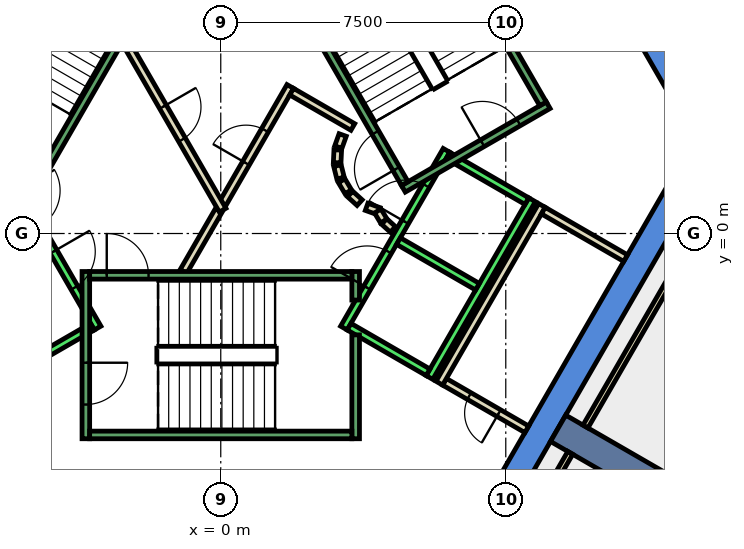
"""IFC4 building model, lengths in metres.
Left out: names, types, materials, properties, quantities, classifications, styles, units other than length and angle.
Written with IfcOpenShell. Run it as: python <this file> out.ifc"""

import sys

from ifc_helpers import new_model, si_unit, direction, frame, frame_2d, origin, place, context, subcontext, project, spatial, polyline, rectangle, outline, extrude, element, fill, save


model = new_model("IFC4")
c1 = context("Model", 3, precision=1e-05, world=origin(), true_north=direction((0.0, 1.0)))
c2 = subcontext(c1, "Body", "Model", "MODEL_VIEW")
j1 = project(units=[si_unit("LENGTHUNIT", "METRE"), si_unit("PLANEANGLEUNIT", "RADIAN")], contexts=[c1])
p1 = place(None, origin())
s1 = spatial("IfcSite", under=j1, at=p1, CompositionType="ELEMENT")
p2 = place(p1, origin())
s2 = spatial("IfcBuilding", under=s1, at=p2, CompositionType="ELEMENT")
p3 = place(p2, frame((0.0, 0.0, 210.8)))
s3 = spatial("IfcBuildingStorey", under=s2, at=p3, CompositionType="ELEMENT", Elevation=210.8)
p4 = place(p3, frame((0.0, 0.0, -0.4)))
e1 = element("IfcWall", 1, at=p4, inside=s3, PredefinedType="SHEAR", context=c2, shape_type="SweptSolid", body=[
    extrude(outline(polyline([(8.084, 11.498), (7.478, 11.148), (12.471, 2.5), (13.279, 2.5), (8.084, 11.498)])), origin(), (0.0, 0.0, 1.0), 4.2),
])
p5 = place(p3, frame((0.0, 0.0, -0.4)))
e2 = element("IfcWall", 2, at=p5, inside=s3, PredefinedType="SHEAR", context=c2, shape_type="SweptSolid", body=[
    extrude(outline(polyline([(6.64, -9.0), (13.279, 2.5), (12.471, 2.5), (6.235, -8.3), (6.64, -9.0)])), origin(), (0.0, 0.0, 1.0), 4.2),
])
p6 = place(p3, frame((8.877, -5.125, -0.4), z_axis=(0.0, 0.0, 1.0), x_axis=(0.866017533419, -0.500013631625, 0.0)))
e3 = element("IfcWall", 3, at=p6, inside=s3, PredefinedType="SHEAR", context=c2, shape_type="SweptSolid", body=[
    extrude(rectangle(XDim=9.0, YDim=0.8, at=frame_2d((4.5, 0.0))), origin(), (0.0, 0.0, 1.0), 4.2),
])
p7 = place(p3, frame((8.053, -5.152, 0.0), z_axis=(0.0, 0.0, 1.0), x_axis=(-0.866022959057, 0.500004234368, 0.0)))
e4 = element("IfcWall", 4, at=p7, inside=s3, PredefinedType="PARTITIONING", context=c2, shape_type="SweptSolid", body=[
    extrude(rectangle(XDim=2.5, YDim=0.2, at=frame_2d((1.25, 0.0))), origin(), (0.0, 0.0, 1.0), 3.8),
])
p8 = place(p7, frame((0.85, 0.0, 0.0)))
e5 = element("IfcOpeningElement", 5, at=p8, cuts=e4, PredefinedType="OPENING", context=c2, shape_type="SweptSolid", body=[
    extrude(rectangle(XDim=0.9, YDim=2.1, at=frame_2d((0.45, 1.05))), frame((0.0, 0.11, 0.0), z_axis=(0.0, -1.0, 0.0), x_axis=(1.0, 0.0, 0.0)), (0.0, 0.0, 1.0), 0.22),
])
p9 = place(p3, frame((5.751, -3.938, 0.0), z_axis=(0.0, 0.0, 1.0), x_axis=(0.500034260056, 0.866005622828, 0.0)))
e6 = element("IfcWall", 6, at=p9, inside=s3, PredefinedType="PARTITIONING", context=c2, shape_type="SweptSolid", body=[
    extrude(rectangle(XDim=5.399, YDim=0.2, at=frame_2d((2.7, 0.0))), origin(), (0.0, 0.0, 1.0), 3.8),
])
p10 = place(p3, frame((8.488, 0.602, 0.0), z_axis=(0.0, 0.0, 1.0), x_axis=(0.866022959057, -0.500004234368, 0.0)))
e7 = element("IfcWall", 7, at=p10, inside=s3, PredefinedType="PARTITIONING", context=c2, shape_type="SweptSolid", body=[
    extrude(rectangle(XDim=2.5, YDim=0.2, at=frame_2d((1.25, 0.0))), origin(), (0.0, 0.0, 1.0), 3.8),
])
p11 = place(p3, frame((7.283, -9.086, 0.0), z_axis=(0.0, 0.0, 1.0), x_axis=(0.500035303972, 0.866005020067, 0.0)))
e8 = element("IfcWall", 8, at=p11, inside=s3, PredefinedType="PARTITIONING", context=c2, shape_type="SweptSolid", body=[
    extrude(rectangle(XDim=3.828, YDim=0.15, at=frame_2d((1.914, 0.0))), origin(), (0.0, 0.0, 1.0), 3.8),
])
p12 = place(p3, frame((-0.982, -1.0, 0.0), z_axis=(0.0, 0.0, 1.0), x_axis=(0.50024047865, 0.865886518847, 0.0)))
e9 = element("IfcWall", 9, at=p12, inside=s3, PredefinedType="PARTITIONING", context=c2, shape_type="SweptSolid", body=[
    extrude(rectangle(XDim=1.863, YDim=0.2, at=frame_2d((0.931, 0.0))), origin(), (0.0, 0.0, 1.0), 3.8),
])
p13 = place(p3, frame((0.05, 0.787, 0.0), z_axis=(0.0, 0.0, 1.0), x_axis=(0.499954076797, 0.866051915934, 0.0)))
e10 = element("IfcWall", 10, at=p13, inside=s3, PredefinedType="PARTITIONING", context=c2, shape_type="SweptSolid", body=[
    extrude(rectangle(XDim=3.558, YDim=0.2, at=frame_2d((1.779, 0.0))), origin(), (0.0, 0.0, 1.0), 3.8),
])
p14 = place(p13, frame((1.229, 0.0, 0.0)))
e11 = element("IfcOpeningElement", 11, at=p14, cuts=e10, PredefinedType="OPENING", context=c2, shape_type="SweptSolid", body=[
    extrude(rectangle(XDim=1.0, YDim=2.1, at=frame_2d((0.5, 1.05))), frame((0.0, 0.11, 0.0), z_axis=(0.0, -1.0, 0.0), x_axis=(1.0, 0.0, 0.0)), (0.0, 0.0, 1.0), 0.22),
])
p15 = place(p3, frame((1.866, 3.732, 0.0), z_axis=(0.0, 0.0, 1.0), x_axis=(0.866043361281, -0.499968895414, 0.0)))
e12 = element("IfcWall", 12, at=p15, inside=s3, PredefinedType="PARTITIONING", context=c2, shape_type="SweptSolid", body=[
    extrude(rectangle(XDim=1.858, YDim=0.2, at=frame_2d((0.929, 0.0))), origin(), (0.0, 0.0, 1.0), 3.8),
])
p16 = place(p3, frame((3.208, 2.592, 0.0), z_axis=(0.0, 0.0, 1.0), x_axis=(-0.337388820924, -0.941365382578, 0.0)))
e13 = element("IfcWall", 13, at=p16, inside=s3, PredefinedType="PARTITIONING", context=c2, shape_type="SweptSolid", body=[
    extrude(rectangle(XDim=0.338, YDim=0.2, at=frame_2d((0.169, 0.0))), origin(), (0.0, 0.0, 1.0), 3.8),
])
p17 = place(p3, frame((3.079, 2.199, 0.0), z_axis=(0.0, 0.0, 1.0), x_axis=(-0.047771483479, -0.998858290933, 0.0)))
e14 = element("IfcWall", 14, at=p17, inside=s3, PredefinedType="PARTITIONING", context=c2, shape_type="SweptSolid", body=[
    extrude(rectangle(XDim=0.337, YDim=0.2, at=frame_2d((0.169, 0.0))), origin(), (0.0, 0.0, 1.0), 3.8),
])
p18 = place(p3, frame((3.07, 1.786, 0.0), z_axis=(0.0, 0.0, 1.0), x_axis=(0.242705583207, -0.970099994784, 0.0)))
e15 = element("IfcWall", 15, at=p18, inside=s3, PredefinedType="PARTITIONING", context=c2, shape_type="SweptSolid", body=[
    extrude(rectangle(XDim=0.338, YDim=0.2, at=frame_2d((0.169, 0.0))), origin(), (0.0, 0.0, 1.0), 3.8),
])
for number, where, z_axis, x_axis in (
    (16, (3.182, 1.388, 0.0), (0.0, 0.0, 1.0), (0.512, -0.859, 0.0)),
    (17, (3.404, 1.039, 0.0), (0.0, 0.0, 1.0), (0.74, -0.672, 0.0)),
):
    element("IfcWall", number, at=place(p3, frame(where, z_axis=z_axis, x_axis=x_axis)), inside=s3, PredefinedType="PARTITIONING", context=c2, shape_type="SweptSolid", body=[
        extrude(rectangle(XDim=0.338, YDim=0.2, at=frame_2d((0.169, 0.0))), origin(), (0.0, 0.0, 1.0), 3.8),
    ])
p19 = place(p3, frame((3.838, 0.702, 0.0), z_axis=(0.0, 0.0, 1.0), x_axis=(0.941035081519, -0.338308993895, 0.0)))
e18 = element("IfcWall", 18, at=p19, inside=s3, PredefinedType="PARTITIONING", context=c2, shape_type="SweptSolid", body=[
    extrude(rectangle(XDim=0.337, YDim=0.2, at=frame_2d((0.168, 0.0))), origin(), (0.0, 0.0, 1.0), 3.8),
])
p20 = place(p3, frame((4.132, 0.593, 0.0), z_axis=(0.0, 0.0, 1.0), x_axis=(0.513561617048, -0.858052717201, 0.0)))
e19 = element("IfcWall", 19, at=p20, inside=s3, PredefinedType="PARTITIONING", context=c2, shape_type="SweptSolid", body=[
    extrude(rectangle(XDim=0.308, YDim=0.2, at=frame_2d((0.154, 0.0))), origin(), (0.0, 0.0, 1.0), 3.8),
])
p21 = place(p3, frame((4.301, 0.315, 0.0), z_axis=(0.0, 0.0, 1.0), x_axis=(0.741798017506, -0.670623367639, 0.0)))
e20 = element("IfcWall", 20, at=p21, inside=s3, PredefinedType="PARTITIONING", context=c2, shape_type="SweptSolid", body=[
    extrude(rectangle(XDim=0.309, YDim=0.2, at=frame_2d((0.154, 0.0))), origin(), (0.0, 0.0, 1.0), 3.8),
])
p22 = place(p3, frame((-2.54, 5.1, 0.0), z_axis=(0.0, 0.0, 1.0), x_axis=(0.499925051871, -0.866068670783, 0.0)))
e21 = element("IfcWall", 21, at=p22, inside=s3, PredefinedType="PARTITIONING", context=c2, shape_type="SweptSolid", body=[
    extrude(rectangle(XDim=5.181, YDim=0.2, at=frame_2d((2.59, 0.0))), origin(), (0.0, 0.0, 1.0), 3.8),
])
p23 = place(p22, frame((2.04, 0.0, 0.0)))
e22 = element("IfcOpeningElement", 22, at=p23, cuts=e21, PredefinedType="OPENING", context=c2, shape_type="SweptSolid", body=[
    extrude(rectangle(XDim=1.0, YDim=2.1, at=frame_2d((0.5, 1.05))), frame((0.0, 0.11, 0.0), z_axis=(0.0, -1.0, 0.0), x_axis=(1.0, 0.0, 0.0)), (0.0, 0.0, 1.0), 0.22),
])
p24 = place(p3, frame((9.597, -5.079, 0.0), z_axis=(0.0, 0.0, 1.0), x_axis=(0.499962477963, 0.866047066059, 0.0)))
e23 = element("IfcWall", 23, at=p24, inside=s3, PredefinedType="PARTITIONING", context=c2, shape_type="SweptSolid", body=[
    extrude(rectangle(XDim=9.979, YDim=0.15, at=frame_2d((4.989, 0.0))), origin(), (0.0, 0.0, 1.0), 3.8),
])
p25 = place(p3, frame((-5.94, 2.188, 0.0), z_axis=(0.0, 0.0, 1.0), x_axis=(0.500034260056, -0.866005622828, 0.0)))
e24 = element("IfcWall", 24, at=p25, inside=s3, PredefinedType="STANDARD", context=c2, shape_type="SweptSolid", body=[
    extrude(rectangle(XDim=5.399, YDim=0.2, at=frame_2d((2.7, 0.0))), origin(), (0.0, 0.0, 1.0), 3.8),
])
p26 = place(p25, frame((3.075, 0.0, 0.0)))
e25 = element("IfcOpeningElement", 25, at=p26, cuts=e24, PredefinedType="OPENING", context=c2, shape_type="SweptSolid", body=[
    extrude(rectangle(XDim=1.1, YDim=2.1, at=frame_2d((0.55, 1.05))), frame((0.0, 0.11, 0.0), z_axis=(0.0, -1.0, 0.0), x_axis=(1.0, 0.0, 0.0)), (0.0, 0.0, 1.0), 0.22),
])
p27 = place(p25, frame((1.225, 0.0, 0.0)))
e26 = element("IfcOpeningElement", 26, at=p27, cuts=e24, PredefinedType="OPENING", context=c2, shape_type="SweptSolid", body=[
    extrude(rectangle(XDim=1.1, YDim=2.1, at=frame_2d((0.55, 1.05))), frame((0.0, 0.11, 0.0), z_axis=(0.0, -1.0, 0.0), x_axis=(1.0, 0.0, 0.0)), (0.0, 0.0, 1.0), 0.22),
])
p28 = place(p3, frame((-3.377, -2.452, 0.0), z_axis=(0.0, 0.0, 1.0), x_axis=(-0.865955154139, -0.50012165622, 0.0)))
e27 = element("IfcWall", 27, at=p28, inside=s3, PredefinedType="STANDARD", context=c2, shape_type="SweptSolid", body=[
    extrude(rectangle(XDim=2.4, YDim=0.2, at=frame_2d((1.2, 0.0))), origin(), (0.0, 0.0, 1.0), 3.8),
])
p29 = place(p3, frame((3.24, -2.488, 0.0), z_axis=(0.0, 0.0, 1.0), x_axis=(0.500034260056, 0.866005622828, 0.0)))
e28 = element("IfcWall", 28, at=p29, inside=s3, PredefinedType="STANDARD", context=c2, shape_type="SweptSolid", body=[
    extrude(rectangle(XDim=5.399, YDim=0.2, at=frame_2d((2.7, 0.0))), origin(), (0.0, 0.0, 1.0), 3.8),
])
p30 = place(p29, frame((3.225, 0.0, 0.0)))
e29 = element("IfcOpeningElement", 29, at=p30, cuts=e28, PredefinedType="OPENING", context=c2, shape_type="SweptSolid", body=[
    extrude(rectangle(XDim=1.1, YDim=2.1, at=frame_2d((0.55, 1.05))), frame((0.0, 0.11, 0.0), z_axis=(0.0, -1.0, 0.0), x_axis=(1.0, 0.0, 0.0)), (0.0, 0.0, 1.0), 0.22),
])
p31 = place(p29, frame((1.225, 0.0, 0.0)))
e30 = element("IfcOpeningElement", 30, at=p31, cuts=e28, PredefinedType="OPENING", context=c2, shape_type="SweptSolid", body=[
    extrude(rectangle(XDim=1.1, YDim=2.1, at=frame_2d((0.55, 1.05))), frame((0.0, 0.11, 0.0), z_axis=(0.0, -1.0, 0.0), x_axis=(1.0, 0.0, 0.0)), (0.0, 0.0, 1.0), 0.22),
])
p32 = place(p3, frame((5.492, -3.788, 0.0), z_axis=(0.0, 0.0, 1.0), x_axis=(0.500034260056, 0.866005622828, 0.0)))
e31 = element("IfcWall", 31, at=p32, inside=s3, PredefinedType="STANDARD", context=c2, shape_type="SweptSolid", body=[
    extrude(rectangle(XDim=5.399, YDim=0.2, at=frame_2d((2.7, 0.0))), origin(), (0.0, 0.0, 1.0), 3.8),
])
p33 = place(p3, frame((3.377, -2.452, 0.0), z_axis=(0.0, 0.0, 1.0), x_axis=(0.865955154139, -0.50012165622, 0.0)))
e32 = element("IfcWall", 32, at=p33, inside=s3, PredefinedType="STANDARD", context=c2, shape_type="SweptSolid", body=[
    extrude(rectangle(XDim=2.4, YDim=0.2, at=frame_2d((1.2, 0.0))), origin(), (0.0, 0.0, 1.0), 3.8),
])
for number, where, z_axis, x_axis in (
    (33, (4.677, -0.2, 0.0), (0.0, 0.0, 1.0), (0.866, -0.5, 0.0)),
    (34, (5.977, 2.052, 0.0), (0.0, 0.0, 1.0), (0.866, -0.5, 0.0)),
):
    element("IfcWall", number, at=place(p3, frame(where, z_axis=z_axis, x_axis=x_axis)), inside=s3, PredefinedType="STANDARD", context=c2, shape_type="SweptSolid", body=[
        extrude(rectangle(XDim=2.399, YDim=0.2, at=frame_2d((1.2, 0.0))), origin(), (0.0, 0.0, 1.0), 3.8),
    ])
p34 = place(p3, frame((-3.55, -1.0, 0.0), z_axis=(0.0, 0.0, 1.0), x_axis=(0.0, -1.0, 0.0)))
e35 = element("IfcWall", 35, at=p34, inside=s3, PredefinedType="STANDARD", context=c2, shape_type="SweptSolid", body=[
    extrude(rectangle(XDim=4.4, YDim=0.2, at=frame_2d((2.2, 0.0))), origin(), (0.0, 0.0, 1.0), 3.8),
])
p35 = place(p34, frame((2.4, 0.0, 0.0)))
e36 = element("IfcOpeningElement", 36, at=p35, cuts=e35, PredefinedType="OPENING", context=c2, shape_type="SweptSolid", body=[
    extrude(rectangle(XDim=1.1, YDim=2.2, at=frame_2d((0.55, 1.1))), frame((0.0, 0.11, 0.0), z_axis=(0.0, -1.0, 0.0), x_axis=(1.0, 0.0, 0.0)), (0.0, 0.0, 1.0), 0.22),
])
p36 = place(p3, frame((3.55, -2.667, 0.0), z_axis=(0.0, 0.0, 1.0), x_axis=(0.0, -1.0, 0.0)))
e37 = element("IfcWall", 37, at=p36, inside=s3, PredefinedType="STANDARD", context=c2, shape_type="SweptSolid", body=[
    extrude(rectangle(XDim=2.733, YDim=0.2, at=frame_2d((1.366, 0.0))), origin(), (0.0, 0.0, 1.0), 3.8),
])
p37 = place(p3, frame((3.55, -1.0, 0.0), z_axis=(0.0, 0.0, 1.0), x_axis=(0.0, -1.0, 0.0)))
e38 = element("IfcWall", 38, at=p37, inside=s3, PredefinedType="STANDARD", context=c2, shape_type="SweptSolid", body=[
    extrude(rectangle(XDim=0.751, YDim=0.2, at=frame_2d((0.375, 0.0))), origin(), (0.0, 0.0, 1.0), 3.8),
])
p38 = place(p3, frame((-3.45, -1.1, 0.0), z_axis=(0.0, 0.0, 1.0), x_axis=(1.0, 0.0, 0.0)))
e39 = element("IfcWall", 39, at=p38, inside=s3, PredefinedType="STANDARD", context=c2, shape_type="SweptSolid", body=[
    extrude(rectangle(XDim=6.9, YDim=0.2, at=frame_2d((3.45, 0.0))), origin(), (0.0, 0.0, 1.0), 3.8),
])
p39 = place(p38, frame((0.45, 0.0, 0.0)))
e40 = element("IfcOpeningElement", 40, at=p39, cuts=e39, PredefinedType="OPENING", context=c2, shape_type="SweptSolid", body=[
    extrude(rectangle(XDim=1.1, YDim=2.2, at=frame_2d((0.55, 1.1))), frame((0.0, 0.11, 0.0), z_axis=(0.0, -1.0, 0.0), x_axis=(1.0, 0.0, 0.0)), (0.0, 0.0, 1.0), 0.22),
])
p40 = place(p3, frame((-3.45, -5.3, 0.0), z_axis=(0.0, 0.0, 1.0), x_axis=(1.0, 0.0, 0.0)))
e41 = element("IfcWall", 41, at=p40, inside=s3, PredefinedType="STANDARD", context=c2, shape_type="SweptSolid", body=[
    extrude(rectangle(XDim=6.9, YDim=0.2, at=frame_2d((3.45, 0.0))), origin(), (0.0, 0.0, 1.0), 3.8),
])
p41 = place(p3, frame((4.806, 1.176, 0.0), z_axis=(0.0, 0.0, 1.0), x_axis=(0.866059941101, 0.499940174841, 0.0)))
e42 = element("IfcWall", 42, at=p41, inside=s3, PredefinedType="STANDARD", context=c2, shape_type="SweptSolid", body=[
    extrude(rectangle(XDim=4.4, YDim=0.2, at=frame_2d((2.2, 0.0))), origin(), (0.0, 0.0, 1.0), 3.8),
])
p42 = place(p41, frame((2.4, 0.0, 0.0)))
e43 = element("IfcOpeningElement", 43, at=p42, cuts=e42, PredefinedType="OPENING", context=c2, shape_type="SweptSolid", body=[
    extrude(rectangle(XDim=1.1, YDim=2.2, at=frame_2d((0.55, 1.1))), frame((0.0, 0.11, 0.0), z_axis=(0.0, -1.0, 0.0), x_axis=(1.0, 0.0, 0.0)), (0.0, 0.0, 1.0), 0.22),
])
p43 = place(p3, frame((4.843, 1.312, 0.0), z_axis=(0.0, 0.0, 1.0), x_axis=(-0.499963383562, 0.866046543262, 0.0)))
e44 = element("IfcWall", 44, at=p43, inside=s3, PredefinedType="STANDARD", context=c2, shape_type="SweptSolid", body=[
    extrude(rectangle(XDim=6.9, YDim=0.2, at=frame_2d((3.45, 0.0))), origin(), (0.0, 0.0, 1.0), 3.8),
])
p44 = place(p43, frame((0.45, 0.0, 0.0)))
e45 = element("IfcOpeningElement", 45, at=p44, cuts=e44, PredefinedType="OPENING", context=c2, shape_type="SweptSolid", body=[
    extrude(rectangle(XDim=1.1, YDim=2.2, at=frame_2d((0.55, 1.1))), frame((0.0, 0.11, 0.0), z_axis=(0.0, -1.0, 0.0), x_axis=(1.0, 0.0, 0.0)), (0.0, 0.0, 1.0), 0.22),
])
p45 = place(p3, frame((8.48, 3.412, 0.0), z_axis=(0.0, 0.0, 1.0), x_axis=(-0.499978703459, 0.866037698999, 0.0)))
e46 = element("IfcWall", 46, at=p45, inside=s3, PredefinedType="STANDARD", context=c2, shape_type="SweptSolid", body=[
    extrude(rectangle(XDim=6.9, YDim=0.2, at=frame_2d((3.45, 0.0))), origin(), (0.0, 0.0, 1.0), 3.8),
])
p46 = place(p3, frame((-1.393, 7.288, 0.0), z_axis=(0.0, 0.0, 1.0), x_axis=(-0.499963383562, -0.866046543262, 0.0)))
e47 = element("IfcWall", 47, at=p46, inside=s3, PredefinedType="STANDARD", context=c2, shape_type="SweptSolid", body=[
    extrude(rectangle(XDim=6.9, YDim=0.2, at=frame_2d((3.45, 0.0))), origin(), (0.0, 0.0, 1.0), 3.8),
])
p47 = place(p46, frame((0.45, 0.0, 0.0)))
e48 = element("IfcOpeningElement", 48, at=p47, cuts=e47, PredefinedType="OPENING", context=c2, shape_type="SweptSolid", body=[
    extrude(rectangle(XDim=1.1, YDim=2.2, at=frame_2d((0.55, 1.1))), frame((0.0, 0.11, 0.0), z_axis=(0.0, -1.0, 0.0), x_axis=(1.0, 0.0, 0.0)), (0.0, 0.0, 1.0), 0.22),
])
p48 = place(p14, origin())
e49 = element("IfcDoor", 49, at=p48, inside=s3, OperationType="SINGLE_SWING_RIGHT", PredefinedType="DOOR", context=c2, shape_type="SweptSolid", body=[
    extrude(rectangle(XDim=1.0, YDim=2.1, at=frame_2d((0.5, 1.05))), frame((0.0, 0.025, 0.0), z_axis=(0.0, -1.0, 0.0), x_axis=(1.0, 0.0, 0.0)), (0.0, 0.0, 1.0), 0.05),
])
fill(e11, e49)
p49 = place(p23, origin())
e50 = element("IfcDoor", 50, at=p49, inside=s3, OperationType="SINGLE_SWING_RIGHT", PredefinedType="DOOR", context=c2, shape_type="SweptSolid", body=[
    extrude(rectangle(XDim=1.0, YDim=2.1, at=frame_2d((0.5, 1.05))), frame((0.0, 0.025, 0.0), z_axis=(0.0, -1.0, 0.0), x_axis=(1.0, 0.0, 0.0)), (0.0, 0.0, 1.0), 0.05),
])
fill(e22, e50)
p50 = place(p8, origin())
e51 = element("IfcDoor", 51, at=p50, inside=s3, OperationType="SINGLE_SWING_LEFT", PredefinedType="DOOR", context=c2, shape_type="SweptSolid", body=[
    extrude(rectangle(XDim=0.9, YDim=2.1, at=frame_2d((0.45, 1.05))), frame((0.0, 0.025, 0.0), z_axis=(0.0, -1.0, 0.0), x_axis=(1.0, 0.0, 0.0)), (0.0, 0.0, 1.0), 0.05),
])
fill(e5, e51)
p51 = place(p30, origin())
e52 = element("IfcDoor", 52, at=p51, inside=s3, OperationType="SLIDING_TO_LEFT", PredefinedType="DOOR", context=c2, shape_type="SweptSolid", body=[
    extrude(rectangle(XDim=1.1, YDim=2.1, at=frame_2d((0.55, 1.05))), frame((0.0, 0.025, 0.0), z_axis=(0.0, -1.0, 0.0), x_axis=(1.0, 0.0, 0.0)), (0.0, 0.0, 1.0), 0.05),
])
fill(e29, e52)
p52 = place(p26, origin())
e53 = element("IfcDoor", 53, at=p52, inside=s3, OperationType="SLIDING_TO_LEFT", PredefinedType="DOOR", context=c2, shape_type="SweptSolid", body=[
    extrude(rectangle(XDim=1.1, YDim=2.1, at=frame_2d((0.55, 1.05))), frame((0.0, 0.025, 0.0), z_axis=(0.0, -1.0, 0.0), x_axis=(1.0, 0.0, 0.0)), (0.0, 0.0, 1.0), 0.05),
])
fill(e25, e53)
p53 = place(p31, origin())
e54 = element("IfcDoor", 54, at=p53, inside=s3, OperationType="SLIDING_TO_LEFT", PredefinedType="DOOR", context=c2, shape_type="SweptSolid", body=[
    extrude(rectangle(XDim=1.1, YDim=2.1, at=frame_2d((0.55, 1.05))), frame((0.0, 0.025, 0.0), z_axis=(0.0, -1.0, 0.0), x_axis=(1.0, 0.0, 0.0)), (0.0, 0.0, 1.0), 0.05),
])
fill(e30, e54)
p54 = place(p39, origin())
e55 = element("IfcDoor", 55, at=p54, inside=s3, OperationType="SINGLE_SWING_LEFT", PredefinedType="DOOR", context=c2, shape_type="SweptSolid", body=[
    extrude(rectangle(XDim=1.1, YDim=2.2, at=frame_2d((0.55, 1.1))), frame((0.0, 0.025, 0.0), z_axis=(0.0, -1.0, 0.0), x_axis=(1.0, 0.0, 0.0)), (0.0, 0.0, 1.0), 0.05),
])
fill(e40, e55)
p55 = place(p35, origin())
e56 = element("IfcDoor", 56, at=p55, inside=s3, OperationType="SINGLE_SWING_LEFT", PredefinedType="DOOR", context=c2, shape_type="SweptSolid", body=[
    extrude(rectangle(XDim=1.1, YDim=2.2, at=frame_2d((0.55, 1.1))), frame((0.0, 0.025, 0.0), z_axis=(0.0, -1.0, 0.0), x_axis=(1.0, 0.0, 0.0)), (0.0, 0.0, 1.0), 0.05),
])
fill(e36, e56)
p56 = place(p44, origin())
e57 = element("IfcDoor", 57, at=p56, inside=s3, OperationType="SINGLE_SWING_LEFT", PredefinedType="DOOR", context=c2, shape_type="SweptSolid", body=[
    extrude(rectangle(XDim=1.1, YDim=2.2, at=frame_2d((0.55, 1.1))), frame((0.0, 0.025, 0.0), z_axis=(0.0, -1.0, 0.0), x_axis=(1.0, 0.0, 0.0)), (0.0, 0.0, 1.0), 0.05),
])
fill(e45, e57)
p57 = place(p42, origin())
e58 = element("IfcDoor", 58, at=p57, inside=s3, OperationType="SINGLE_SWING_LEFT", PredefinedType="DOOR", context=c2, shape_type="SweptSolid", body=[
    extrude(rectangle(XDim=1.1, YDim=2.2, at=frame_2d((0.55, 1.1))), frame((0.0, 0.025, 0.0), z_axis=(0.0, -1.0, 0.0), x_axis=(1.0, 0.0, 0.0)), (0.0, 0.0, 1.0), 0.05),
])
fill(e43, e58)
save(model, sys.argv[1])
